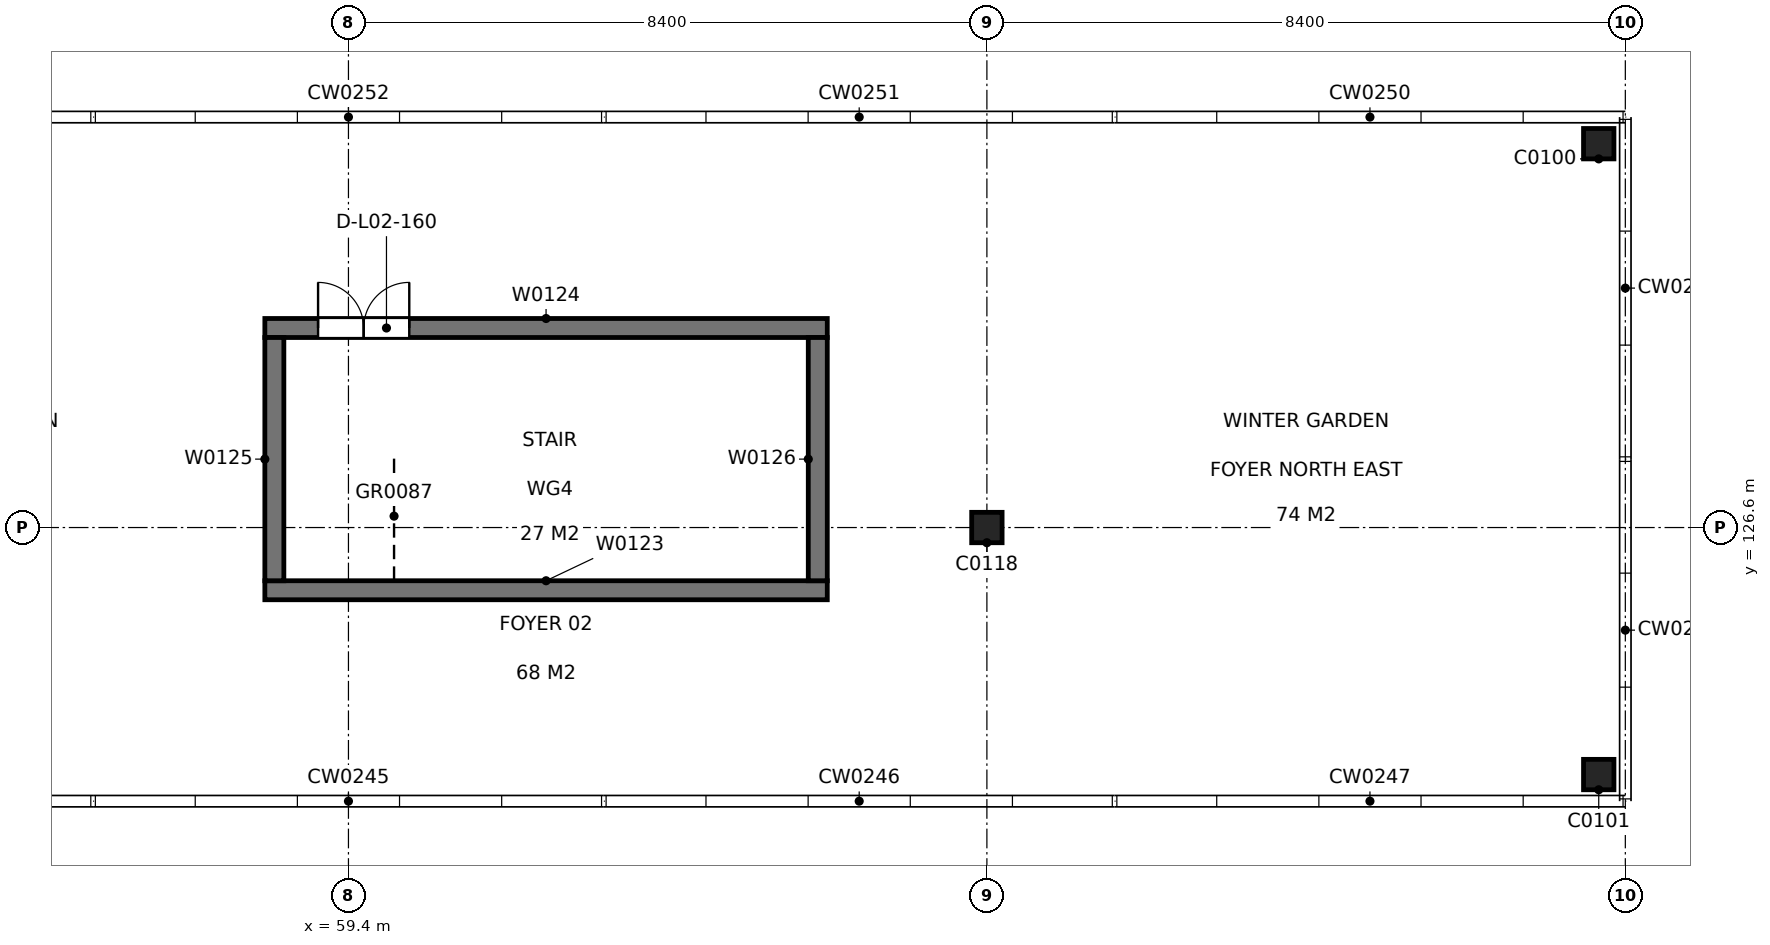
"""IFC4 building model, lengths in metres.
Left out: names, types, materials, properties, quantities, classifications, styles, units other than length and angle.
Written with IfcOpenShell. Run it as: python <this file> out.ifc"""

import sys

from ifc_helpers import new_model, si_unit, direction, frame, frame_2d, origin, origin_2d, place, context, subcontext, project, spatial, rectangle, extrude, element, fill, save


model = new_model("IFC4")
c1 = context("Model", 3, precision=1e-05, world=origin(), true_north=direction((0.0, 1.0)))
c2 = subcontext(c1, "Body", "Model", "MODEL_VIEW")
j1 = project(units=[si_unit("LENGTHUNIT", "METRE"), si_unit("PLANEANGLEUNIT", "RADIAN")], contexts=[c1])
p1 = place(None, origin())
s1 = spatial("IfcSite", under=j1, at=p1, CompositionType="ELEMENT")
p2 = place(p1, origin())
s2 = spatial("IfcBuilding", under=s1, at=p2, CompositionType="ELEMENT")
p3 = place(p2, frame((0.0, 0.0, 9.6)))
s3 = spatial("IfcBuildingStorey", under=s2, at=p3, CompositionType="ELEMENT", Elevation=9.6)
for number, where, z_axis, x_axis in (
    (1, (75.85, 131.65, 0.0), (0.0, 0.0, 1.0), (1.0, 0.0, 0.0)),
    (2, (75.85, 123.35, 0.0), (0.0, 0.0, 1.0), (1.0, 0.0, 0.0)),
    (3, (67.8, 126.6, 0.0), (0.0, 0.0, 1.0), (1.0, 0.0, 0.0)),
):
    element("IfcColumn", number, at=place(p3, frame(where, z_axis=z_axis, x_axis=x_axis)), inside=s3, PredefinedType="COLUMN", context=c2, shape_type="SweptSolid", body=[
        extrude(rectangle(XDim=0.4, YDim=0.4, at=origin_2d()), origin(), (0.0, 0.0, 1.0), 4.8),
    ])
p4 = place(p3, frame((58.3, 125.775, 0.0), z_axis=(0.0, 0.0, 1.0), x_axis=(1.0, 0.0, 0.0)))
e4 = element("IfcWall", 4, at=p4, inside=s3, PredefinedType="SOLIDWALL", context=c2, shape_type="SweptSolid", body=[
    extrude(rectangle(XDim=7.4, YDim=0.25, at=frame_2d((3.7, 0.0))), origin(), (0.0, 0.0, 1.0), 4.8),
])
p5 = place(p3, frame((58.3, 129.225, 0.0), z_axis=(0.0, 0.0, 1.0), x_axis=(1.0, 0.0, 0.0)))
e5 = element("IfcWall", 5, at=p5, inside=s3, PredefinedType="SOLIDWALL", context=c2, shape_type="SweptSolid", body=[
    extrude(rectangle(XDim=7.4, YDim=0.25, at=frame_2d((3.7, 0.0))), origin(), (0.0, 0.0, 1.0), 4.8),
])
p6 = place(p5, frame((0.7, 0.0, 0.0)))
e6 = element("IfcOpeningElement", 6, at=p6, cuts=e5, PredefinedType="OPENING", context=c2, shape_type="SweptSolid", body=[
    extrude(rectangle(XDim=1.2, YDim=2.1, at=frame_2d((0.6, 1.05))), frame((0.0, 0.135, 0.0), z_axis=(0.0, -1.0, 0.0), x_axis=(1.0, 0.0, 0.0)), (0.0, 0.0, 1.0), 0.27),
])
for number, where, z_axis, x_axis in (
    (7, (58.425, 125.9, 0.0), (0.0, 0.0, 1.0), (0.0, 1.0, 0.0)),
    (8, (65.575, 125.9, 0.0), (0.0, 0.0, 1.0), (0.0, 1.0, 0.0)),
):
    element("IfcWall", number, at=place(p3, frame(where, z_axis=z_axis, x_axis=x_axis)), inside=s3, PredefinedType="SOLIDWALL", context=c2, shape_type="SweptSolid", body=[
        extrude(rectangle(XDim=3.2, YDim=0.25, at=frame_2d((1.6, 0.0))), origin(), (0.0, 0.0, 1.0), 4.8),
    ])
p7 = place(p6, origin())
e9 = element("IfcDoor", 9, at=p7, inside=s3, OperationType="DOUBLE_DOOR_SINGLE_SWING", PredefinedType="DOOR", context=c2, shape_type="SweptSolid", body=[
    extrude(rectangle(XDim=1.2, YDim=2.1, at=frame_2d((0.6, 1.05))), frame((0.0, 0.025, 0.0), z_axis=(0.0, -1.0, 0.0), x_axis=(1.0, 0.0, 0.0)), (0.0, 0.0, 1.0), 0.05),
])
fill(e6, e9)
save(model, sys.argv[1])
